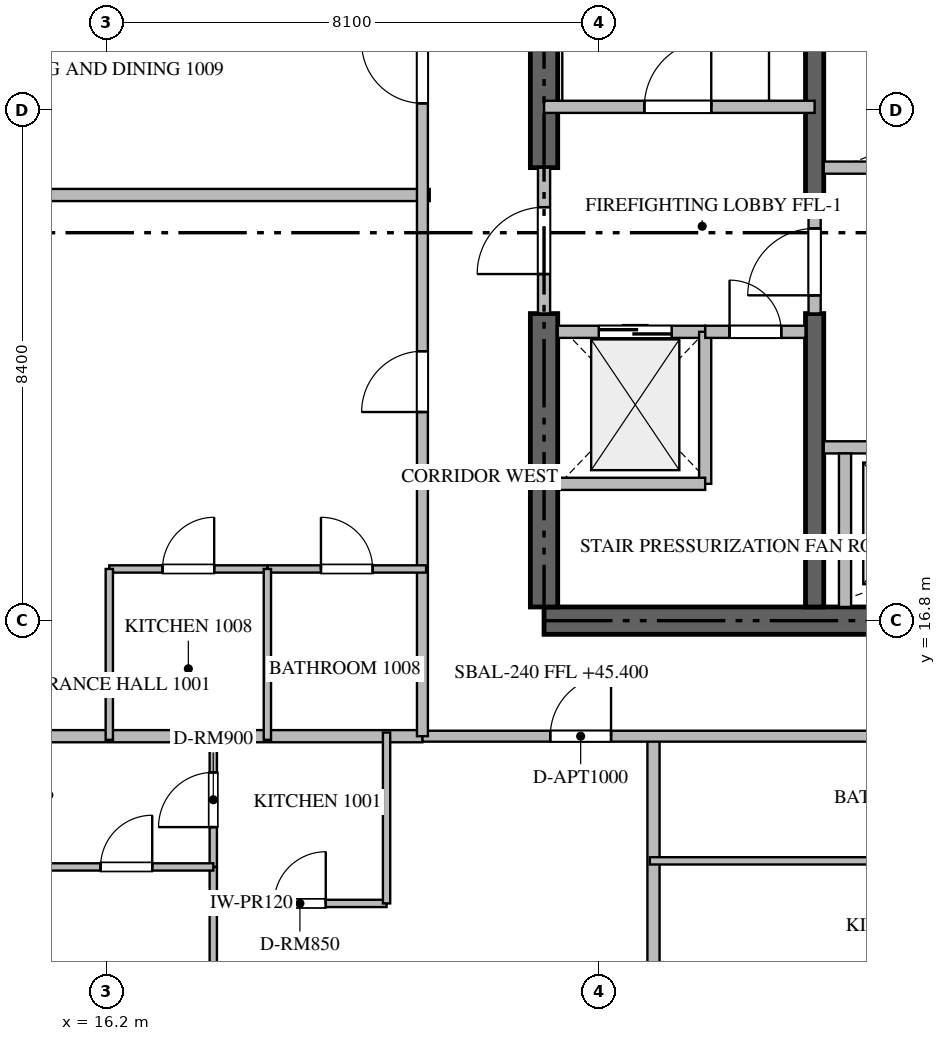
"""IFC4 building model, lengths in metres.
Left out: names, types, materials, properties, quantities, classifications, styles, units other than length and angle.
Written with IfcOpenShell. Run it as: python <this file> out.ifc"""

import sys

from ifc_helpers import new_model, si_unit, direction, frame, frame_2d, origin, place, context, subcontext, project, spatial, rectangle, extrude, source, transform, mapped, element, fill, save


model = new_model("IFC4")
c1 = context("Model", 3, precision=1e-05, world=origin(), true_north=direction((0.0, 1.0)))
c2 = subcontext(c1, "Body", "Model", "MODEL_VIEW")
j1 = project(units=[si_unit("LENGTHUNIT", "METRE"), si_unit("PLANEANGLEUNIT", "RADIAN")], contexts=[c1])
p1 = place(None, origin())
s1 = spatial("IfcSite", under=j1, at=p1, CompositionType="ELEMENT")
p2 = place(p1, origin())
s2 = spatial("IfcBuilding", under=s1, at=p2, CompositionType="ELEMENT")
p3 = place(p2, frame((0.0, 0.0, 45.45)))
s3 = spatial("IfcBuildingStorey", under=s2, at=p3, CompositionType="ELEMENT", Elevation=45.45)
p4 = place(p3, frame((23.4, 16.8, -0.26), z_axis=(0.0, 0.0, 1.0), x_axis=(1.0, 0.0, 0.0)))
e1 = element("IfcWall", 1, at=p4, inside=s3, PredefinedType="SHEAR", context=c2, shape_type="SweptSolid", body=[
    extrude(rectangle(XDim=18.0, YDim=0.45, at=frame_2d((9.0, 0.0))), origin(), (0.0, 0.0, 1.0), 3.748),
])
p5 = place(p3, frame((23.4, 17.025, -0.26), z_axis=(0.0, 0.0, 1.0), x_axis=(0.0, 1.0, 0.0)))
e2 = element("IfcWall", 2, at=p5, inside=s3, PredefinedType="SHEAR", context=c2, shape_type="SweptSolid", body=[
    extrude(rectangle(XDim=4.825, YDim=0.45, at=frame_2d((2.413, 0.0))), origin(), (0.0, 0.0, 1.0), 3.748),
])
p6 = place(p3, frame((23.4, 24.25, -0.26), z_axis=(0.0, 0.0, 1.0), x_axis=(0.0, 1.0, 0.0)))
e3 = element("IfcWall", 3, at=p6, inside=s3, PredefinedType="SHEAR", context=c2, shape_type="SweptSolid", body=[
    extrude(rectangle(XDim=9.125, YDim=0.45, at=frame_2d((4.562, 0.0))), origin(), (0.0, 0.0, 1.0), 3.748),
])
p7 = place(p3, frame((27.85, 17.025, -0.26), z_axis=(0.0, 0.0, 1.0), x_axis=(0.0, 1.0, 0.0)))
e4 = element("IfcWall", 4, at=p7, inside=s3, PredefinedType="SHEAR", context=c2, shape_type="SweptSolid", body=[
    extrude(rectangle(XDim=4.825, YDim=0.3, at=frame_2d((2.413, 0.0))), origin(), (0.0, 0.0, 1.0), 3.748),
])
p8 = place(p3, frame((27.85, 23.55, -0.26), z_axis=(0.0, 0.0, 1.0), x_axis=(0.0, 1.0, 0.0)))
e5 = element("IfcWall", 5, at=p8, inside=s3, PredefinedType="SHEAR", context=c2, shape_type="SweptSolid", body=[
    extrude(rectangle(XDim=9.825, YDim=0.3, at=frame_2d((4.913, 0.0))), origin(), (0.0, 0.0, 1.0), 3.748),
])
p9 = place(p3, frame((23.4, 25.25, 0.0), z_axis=(0.0, 0.0, 1.0), x_axis=(1.0, 0.0, 0.0)))
e6 = element("IfcWall", 6, at=p9, inside=s3, PredefinedType="STANDARD", context=c2, shape_type="SweptSolid", body=[
    extrude(rectangle(XDim=4.45, YDim=0.2, at=frame_2d((2.225, 0.0))), origin(), (0.0, 0.0, 1.0), 3.49),
])
p10 = place(p9, frame((1.65, 0.0, 0.0)))
e7 = element("IfcOpeningElement", 7, at=p10, cuts=e6, PredefinedType="OPENING", context=c2, shape_type="SweptSolid", body=[
    extrude(rectangle(XDim=1.1, YDim=2.15, at=frame_2d((0.55, 1.075))), frame((0.0, 0.11, 0.0), z_axis=(0.0, -1.0, 0.0), x_axis=(1.0, 0.0, 0.0)), (0.0, 0.0, 1.0), 0.22),
])
p11 = place(p3, frame((23.625, 21.55, 0.0), z_axis=(0.0, 0.0, 1.0), x_axis=(1.0, 0.0, 0.0)))
e8 = element("IfcWall", 8, at=p11, inside=s3, PredefinedType="STANDARD", context=c2, shape_type="SweptSolid", body=[
    extrude(rectangle(XDim=2.425, YDim=0.2, at=frame_2d((1.212, 0.0))), origin(), (0.0, 0.0, 1.0), 3.49),
])
p12 = place(p11, frame((0.675, 0.0, 0.0)))
e9 = element("IfcOpeningElement", 9, at=p12, cuts=e8, PredefinedType="OPENING", context=c2, shape_type="SweptSolid", body=[
    extrude(rectangle(XDim=1.2, YDim=2.2, at=frame_2d((0.6, 1.1))), frame((0.0, 0.11, 0.0), z_axis=(0.0, -1.0, 0.0), x_axis=(1.0, 0.0, 0.0)), (0.0, 0.0, 1.0), 0.22),
])
p13 = place(p3, frame((28.0, 19.65, 0.0), z_axis=(0.0, 0.0, 1.0), x_axis=(1.0, 0.0, 0.0)))
e10 = element("IfcWall", 10, at=p13, inside=s3, PredefinedType="STANDARD", context=c2, shape_type="SweptSolid", body=[
    extrude(rectangle(XDim=2.65, YDim=0.2, at=frame_2d((1.325, 0.0))), origin(), (0.0, 0.0, 1.0), 3.49),
])
p14 = place(p13, frame((0.9, 0.0, 0.0)))
e11 = element("IfcOpeningElement", 11, at=p14, cuts=e10, PredefinedType="OPENING", context=c2, shape_type="SweptSolid", body=[
    extrude(rectangle(XDim=1.1, YDim=2.2, at=frame_2d((0.55, 1.1))), frame((0.0, 0.11, 0.0), z_axis=(0.0, -1.0, 0.0), x_axis=(1.0, 0.0, 0.0)), (0.0, 0.0, 1.0), 0.22),
])
p15 = place(p3, frame((28.35, 17.025, 0.0), z_axis=(0.0, 0.0, 1.0), x_axis=(0.0, 1.0, 0.0)))
e12 = element("IfcWall", 12, at=p15, inside=s3, PredefinedType="STANDARD", context=c2, shape_type="SweptSolid", body=[
    extrude(rectangle(XDim=2.525, YDim=0.2, at=frame_2d((1.263, 0.0))), origin(), (0.0, 0.0, 1.0), 3.49),
])
p16 = place(p3, frame((28.0, 24.25, 0.0), z_axis=(0.0, 0.0, 1.0), x_axis=(1.0, 0.0, 0.0)))
e13 = element("IfcWall", 13, at=p16, inside=s3, PredefinedType="STANDARD", context=c2, shape_type="SweptSolid", body=[
    extrude(rectangle(XDim=2.425, YDim=0.2, at=frame_2d((1.212, 0.0))), origin(), (0.0, 0.0, 1.0), 3.49),
])
p17 = place(p3, frame((26.05, 19.05, 0.0), z_axis=(0.0, 0.0, 1.0), x_axis=(0.0, 1.0, 0.0)))
e14 = element("IfcWall", 14, at=p17, inside=s3, PredefinedType="STANDARD", context=c2, shape_type="SweptSolid", body=[
    extrude(rectangle(XDim=2.5, YDim=0.2, at=frame_2d((1.25, 0.0))), origin(), (0.0, 0.0, 1.0), 3.49),
])
p18 = place(p3, frame((23.625, 19.05, 0.0), z_axis=(0.0, 0.0, 1.0), x_axis=(1.0, 0.0, 0.0)))
e15 = element("IfcWall", 15, at=p18, inside=s3, PredefinedType="STANDARD", context=c2, shape_type="SweptSolid", body=[
    extrude(rectangle(XDim=2.425, YDim=0.2, at=frame_2d((1.212, 0.0))), origin(), (0.0, 0.0, 1.0), 3.49),
])
p19 = place(p3, frame((26.052, 21.55, 0.0), z_axis=(0.0, 0.0, 1.0), x_axis=(1.0, 0.0, 0.0)))
e16 = element("IfcWall", 16, at=p19, inside=s3, PredefinedType="STANDARD", context=c2, shape_type="SweptSolid", body=[
    extrude(rectangle(XDim=1.648, YDim=0.2, at=frame_2d((0.824, 0.0))), origin(), (0.0, 0.0, 1.0), 3.49),
])
p20 = place(p19, frame((0.399, 0.0, 0.0)))
e17 = element("IfcOpeningElement", 17, at=p20, cuts=e16, PredefinedType="OPENING", context=c2, shape_type="SweptSolid", body=[
    extrude(rectangle(XDim=0.85, YDim=2.1, at=frame_2d((0.425, 1.05))), frame((0.0, 0.11, 0.0), z_axis=(0.0, -1.0, 0.0), x_axis=(1.0, 0.0, 0.0)), (0.0, 0.0, 1.0), 0.22),
])
p21 = place(p3, frame((23.4, 21.852, 0.0), z_axis=(0.0, 0.0, 1.0), x_axis=(0.0, 1.0, 0.0)))
e18 = element("IfcWall", 18, at=p21, inside=s3, PredefinedType="STANDARD", context=c2, shape_type="SweptSolid", body=[
    extrude(rectangle(XDim=2.396, YDim=0.2, at=frame_2d((1.198, 0.0))), origin(), (0.0, 0.0, 1.0), 3.49),
])
p22 = place(p21, frame((0.648, 0.0, 0.0)))
e19 = element("IfcOpeningElement", 19, at=p22, cuts=e18, PredefinedType="OPENING", context=c2, shape_type="SweptSolid", body=[
    extrude(rectangle(XDim=1.1, YDim=2.15, at=frame_2d((0.55, 1.075))), frame((0.0, 0.11, 0.0), z_axis=(0.0, -1.0, 0.0), x_axis=(1.0, 0.0, 0.0)), (0.0, 0.0, 1.0), 0.22),
])
p23 = place(p3, frame((27.85, 21.852, 0.0), z_axis=(0.0, 0.0, 1.0), x_axis=(0.0, 1.0, 0.0)))
e20 = element("IfcWall", 20, at=p23, inside=s3, PredefinedType="STANDARD", context=c2, shape_type="SweptSolid", body=[
    extrude(rectangle(XDim=1.696, YDim=0.2, at=frame_2d((0.848, 0.0))), origin(), (0.0, 0.0, 1.0), 3.49),
])
p24 = place(p23, frame((0.298, 0.0, 0.0)))
e21 = element("IfcOpeningElement", 21, at=p24, cuts=e20, PredefinedType="OPENING", context=c2, shape_type="SweptSolid", body=[
    extrude(rectangle(XDim=1.1, YDim=2.15, at=frame_2d((0.55, 1.075))), frame((0.0, 0.11, 0.0), z_axis=(0.0, -1.0, 0.0), x_axis=(1.0, 0.0, 0.0)), (0.0, 0.0, 1.0), 0.22),
])
p25 = place(p3, frame((25.2, 0.282, 0.0), z_axis=(0.0, 0.0, 1.0), x_axis=(0.0, 1.0, 0.0)))
e22 = element("IfcWall", 22, at=p25, inside=s3, PredefinedType="PARTITIONING", context=c2, shape_type="SweptSolid", body=[
    extrude(rectangle(XDim=14.618, YDim=0.2, at=frame_2d((7.309, 0.0))), origin(), (0.0, 0.0, 1.0), 3.49),
])
p26 = place(p3, frame((6.082, 23.8, 0.0), z_axis=(0.0, 0.0, 1.0), x_axis=(1.0, 0.0, 0.0)))
e23 = element("IfcWall", 23, at=p26, inside=s3, PredefinedType="PARTITIONING", context=c2, shape_type="SweptSolid", body=[
    extrude(rectangle(XDim=15.438, YDim=0.2, at=frame_2d((7.719, 0.0))), origin(), (0.0, 0.0, 1.0), 3.49),
])
p27 = place(p3, frame((6.082, 14.9, 0.0), z_axis=(0.0, 0.0, 1.0), x_axis=(1.0, 0.0, 0.0)))
e24 = element("IfcWall", 24, at=p27, inside=s3, PredefinedType="PARTITIONING", context=c2, shape_type="SweptSolid", body=[
    extrude(rectangle(XDim=15.318, YDim=0.2, at=frame_2d((7.659, 0.0))), origin(), (0.0, 0.0, 1.0), 3.49),
])
p28 = place(p3, frame((21.402, 14.9, 0.0), z_axis=(0.0, 0.0, 1.0), x_axis=(1.0, 0.0, 0.0)))
e25 = element("IfcWall", 25, at=p28, inside=s3, PredefinedType="PARTITIONING", context=c2, shape_type="SweptSolid", body=[
    extrude(rectangle(XDim=21.996, YDim=0.18, at=frame_2d((10.998, 0.0))), origin(), (0.0, 0.0, 1.0), 3.49),
])
p29 = place(p28, frame((2.1, 0.0, 0.0)))
e26 = element("IfcOpeningElement", 26, at=p29, cuts=e25, PredefinedType="OPENING", context=c2, shape_type="SweptSolid", body=[
    extrude(rectangle(XDim=1.0, YDim=2.15, at=frame_2d((0.5, 1.075))), frame((0.0, 0.1, 0.0), z_axis=(0.0, -1.0, 0.0), x_axis=(1.0, 0.0, 0.0)), (0.0, 0.0, 1.0), 0.2),
])
p30 = place(p28, frame((14.319, 0.0, 0.0)))
e27 = element("IfcOpeningElement", 27, at=p30, cuts=e25, PredefinedType="OPENING", context=c2, shape_type="SweptSolid", body=[
    extrude(rectangle(XDim=1.0, YDim=2.15, at=frame_2d((0.5, 1.075))), frame((0.0, 0.1, 0.0), z_axis=(0.0, -1.0, 0.0), x_axis=(1.0, 0.0, 0.0)), (0.0, 0.0, 1.0), 0.2),
])
p31 = place(p28, frame((18.896, 0.0, 0.0)))
e28 = element("IfcOpeningElement", 28, at=p31, cuts=e25, PredefinedType="OPENING", context=c2, shape_type="SweptSolid", body=[
    extrude(rectangle(XDim=1.0, YDim=2.15, at=frame_2d((0.5, 1.075))), frame((0.0, 0.1, 0.0), z_axis=(0.0, -1.0, 0.0), x_axis=(1.0, 0.0, 0.0)), (0.0, 0.0, 1.0), 0.2),
])
p32 = place(p3, frame((21.4, 14.9, 0.0), z_axis=(0.0, 0.0, 1.0), x_axis=(0.0, 1.0, 0.0)))
e29 = element("IfcWall", 29, at=p32, inside=s3, PredefinedType="PARTITIONING", context=c2, shape_type="SweptSolid", body=[
    extrude(rectangle(XDim=20.6, YDim=0.18, at=frame_2d((10.3, 0.0))), origin(), (0.0, 0.0, 1.0), 3.49),
])
p33 = place(p32, frame((5.331, 0.0, 0.0)))
e30 = element("IfcOpeningElement", 30, at=p33, cuts=e29, PredefinedType="OPENING", context=c2, shape_type="SweptSolid", body=[
    extrude(rectangle(XDim=1.0, YDim=2.15, at=frame_2d((0.5, 1.075))), frame((0.0, 0.1, 0.0), z_axis=(0.0, -1.0, 0.0), x_axis=(1.0, 0.0, 0.0)), (0.0, 0.0, 1.0), 0.2),
])
p34 = place(p32, frame((10.408, 0.0, 0.0)))
e31 = element("IfcOpeningElement", 31, at=p34, cuts=e29, PredefinedType="OPENING", context=c2, shape_type="SweptSolid", body=[
    extrude(rectangle(XDim=1.0, YDim=2.15, at=frame_2d((0.5, 1.075))), frame((0.0, 0.1, 0.0), z_axis=(0.0, -1.0, 0.0), x_axis=(1.0, 0.0, 0.0)), (0.0, 0.0, 1.0), 0.2),
])
p35 = place(p3, frame((17.96, 12.15, 0.0), z_axis=(0.0, 0.0, 1.0), x_axis=(1.0, 0.0, 0.0)))
e32 = element("IfcWall", 32, at=p35, inside=s3, PredefinedType="PARTITIONING", context=c2, shape_type="SweptSolid", body=[
    extrude(rectangle(XDim=2.85, YDim=0.12, at=frame_2d((1.425, 0.0))), origin(), (0.0, 0.0, 1.0), 3.49),
])
p36 = place(p35, frame((1.0, 0.0, 0.0)))
e33 = element("IfcOpeningElement", 33, at=p36, cuts=e32, PredefinedType="OPENING", context=c2, shape_type="SweptSolid", body=[
    extrude(rectangle(XDim=0.85, YDim=2.1, at=frame_2d((0.425, 1.05))), frame((0.0, 0.07, 0.0), z_axis=(0.0, -1.0, 0.0), x_axis=(1.0, 0.0, 0.0)), (0.0, 0.0, 1.0), 0.14),
])
p37 = place(p3, frame((20.81, 12.15, 0.0), z_axis=(0.0, 0.0, 1.0), x_axis=(0.0, 1.0, 0.0)))
e34 = element("IfcWall", 34, at=p37, inside=s3, PredefinedType="PARTITIONING", context=c2, shape_type="SweptSolid", body=[
    extrude(rectangle(XDim=2.81, YDim=0.12, at=frame_2d((1.405, 0.0))), origin(), (0.0, 0.0, 1.0), 3.49),
])
p38 = place(p3, frame((17.96, 12.75, 0.0), z_axis=(0.0, 0.0, 1.0), x_axis=(0.0, 1.0, 0.0)))
e35 = element("IfcWall", 35, at=p38, inside=s3, PredefinedType="PARTITIONING", context=c2, shape_type="SweptSolid", body=[
    extrude(rectangle(XDim=2.21, YDim=0.12, at=frame_2d((1.105, 0.0))), origin(), (0.0, 0.0, 1.0), 3.49),
])
p39 = place(p38, frame((0.655, 0.0, 0.0)))
e36 = element("IfcOpeningElement", 36, at=p39, cuts=e35, PredefinedType="OPENING", context=c2, shape_type="SweptSolid", body=[
    extrude(rectangle(XDim=0.9, YDim=2.1, at=frame_2d((0.45, 1.05))), frame((0.0, 0.07, 0.0), z_axis=(0.0, -1.0, 0.0), x_axis=(1.0, 0.0, 0.0)), (0.0, 0.0, 1.0), 0.14),
])
p40 = place(p3, frame((17.96, 8.426, 0.0), z_axis=(0.0, 0.0, 1.0), x_axis=(0.0, 1.0, 0.0)))
e37 = element("IfcWall", 37, at=p40, inside=s3, PredefinedType="PARTITIONING", context=c2, shape_type="SweptSolid", body=[
    extrude(rectangle(XDim=4.322, YDim=0.12, at=frame_2d((2.161, 0.0))), origin(), (0.0, 0.0, 1.0), 3.49),
])
p41 = place(p3, frame((15.102, 12.75, 0.0), z_axis=(0.0, 0.0, 1.0), x_axis=(1.0, 0.0, 0.0)))
e38 = element("IfcWall", 38, at=p41, inside=s3, PredefinedType="PARTITIONING", context=c2, shape_type="SweptSolid", body=[
    extrude(rectangle(XDim=2.858, YDim=0.12, at=frame_2d((1.429, 0.0))), origin(), (0.0, 0.0, 1.0), 3.49),
])
p42 = place(p41, frame((1.004, 0.0, 0.0)))
e39 = element("IfcOpeningElement", 39, at=p42, cuts=e38, PredefinedType="OPENING", context=c2, shape_type="SweptSolid", body=[
    extrude(rectangle(XDim=0.85, YDim=2.1, at=frame_2d((0.425, 1.05))), frame((0.0, 0.07, 0.0), z_axis=(0.0, -1.0, 0.0), x_axis=(1.0, 0.0, 0.0)), (0.0, 0.0, 1.0), 0.14),
])
p43 = place(p3, frame((25.14, 12.85, 0.0), z_axis=(0.0, 0.0, 1.0), x_axis=(1.0, 0.0, 0.0)))
e40 = element("IfcWall", 40, at=p43, inside=s3, PredefinedType="PARTITIONING", context=c2, shape_type="SweptSolid", body=[
    extrude(rectangle(XDim=8.49, YDim=0.12, at=frame_2d((4.245, 0.0))), origin(), (0.0, 0.0, 1.0), 3.49),
])
p44 = place(p3, frame((16.25, 17.65, 0.0), z_axis=(0.0, 0.0, 1.0), x_axis=(1.0, 0.0, 0.0)))
e41 = element("IfcWall", 41, at=p44, inside=s3, PredefinedType="PARTITIONING", context=c2, shape_type="SweptSolid", body=[
    extrude(rectangle(XDim=2.6, YDim=0.12, at=frame_2d((1.3, 0.0))), origin(), (0.0, 0.0, 1.0), 3.49),
])
p45 = place(p44, frame((0.875, 0.0, 0.0)))
e42 = element("IfcOpeningElement", 42, at=p45, cuts=e41, PredefinedType="OPENING", context=c2, shape_type="SweptSolid", body=[
    extrude(rectangle(XDim=0.85, YDim=2.1, at=frame_2d((0.425, 1.05))), frame((0.0, 0.07, 0.0), z_axis=(0.0, -1.0, 0.0), x_axis=(1.0, 0.0, 0.0)), (0.0, 0.0, 1.0), 0.14),
])
p46 = place(p3, frame((18.852, 17.65, 0.0), z_axis=(0.0, 0.0, 1.0), x_axis=(1.0, 0.0, 0.0)))
e43 = element("IfcWall", 43, at=p46, inside=s3, PredefinedType="PARTITIONING", context=c2, shape_type="SweptSolid", body=[
    extrude(rectangle(XDim=2.608, YDim=0.12, at=frame_2d((1.304, 0.0))), origin(), (0.0, 0.0, 1.0), 3.49),
])
p47 = place(p46, frame((0.879, 0.0, 0.0)))
e44 = element("IfcOpeningElement", 44, at=p47, cuts=e43, PredefinedType="OPENING", context=c2, shape_type="SweptSolid", body=[
    extrude(rectangle(XDim=0.85, YDim=2.1, at=frame_2d((0.425, 1.05))), frame((0.0, 0.07, 0.0), z_axis=(0.0, -1.0, 0.0), x_axis=(1.0, 0.0, 0.0)), (0.0, 0.0, 1.0), 0.14),
])
for number, where, z_axis, x_axis in (
    (45, (18.85, 14.84, 0.0), (0.0, 0.0, 1.0), (0.0, 1.0, 0.0)),
    (46, (16.25, 14.84, 0.0), (0.0, 0.0, 1.0), (0.0, 1.0, 0.0)),
):
    element("IfcWall", number, at=place(p3, frame(where, z_axis=z_axis, x_axis=x_axis)), inside=s3, PredefinedType="PARTITIONING", context=c2, shape_type="SweptSolid", body=[
        extrude(rectangle(XDim=2.81, YDim=0.12, at=frame_2d((1.405, 0.0))), origin(), (0.0, 0.0, 1.0), 3.49),
    ])
m1 = source(origin(), c2, "Body", "SweptSolid", [
    extrude(rectangle(XDim=1.1, YDim=2.15, at=frame_2d((0.55, 1.075))), frame((0.0, 0.025, 0.0), z_axis=(0.0, -1.0, 0.0), x_axis=(1.0, 0.0, 0.0)), (0.0, 0.0, 1.0), 0.05),
])
p48 = place(p10, origin())
e47 = element("IfcDoor", 47, at=p48, inside=s3, OperationType="SINGLE_SWING_RIGHT", PredefinedType="DOOR", context=c2, shape_type="MappedRepresentation", body=[
    mapped(m1, transform((0.0, 0.0, 0.0), scale=1.0)),
])
fill(e7, e47)
m2 = source(origin(), c2, "Body", "SweptSolid", [
    extrude(rectangle(XDim=1.2, YDim=2.2, at=frame_2d((0.6, 1.1))), frame((0.0, 0.025, 0.0), z_axis=(0.0, -1.0, 0.0), x_axis=(1.0, 0.0, 0.0)), (0.0, 0.0, 1.0), 0.05),
])
p49 = place(p12, origin())
e48 = element("IfcDoor", 48, at=p49, inside=s3, OperationType="DOUBLE_DOOR_SLIDING", PredefinedType="DOOR", context=c2, shape_type="MappedRepresentation", body=[
    mapped(m2, transform((0.0, 0.0, 0.0), scale=1.0)),
])
fill(e9, e48)
m3 = source(origin(), c2, "Body", "SweptSolid", [
    extrude(rectangle(XDim=0.85, YDim=2.1, at=frame_2d((0.425, 1.05))), frame((0.0, 0.025, 0.0), z_axis=(0.0, -1.0, 0.0), x_axis=(1.0, 0.0, 0.0)), (0.0, 0.0, 1.0), 0.05),
])
p50 = place(p20, origin())
e49 = element("IfcDoor", 49, at=p50, inside=s3, OperationType="SINGLE_SWING_LEFT", PredefinedType="DOOR", context=c2, shape_type="MappedRepresentation", body=[
    mapped(m3, transform((0.0, 0.0, 0.0), scale=1.0)),
])
fill(e17, e49)
p51 = place(p22, origin())
e50 = element("IfcDoor", 50, at=p51, inside=s3, OperationType="SINGLE_SWING_LEFT", PredefinedType="DOOR", context=c2, shape_type="MappedRepresentation", body=[
    mapped(m1, transform((0.0, 0.0, 0.0), scale=1.0)),
])
fill(e19, e50)
p52 = place(p24, origin())
e51 = element("IfcDoor", 51, at=p52, inside=s3, OperationType="SINGLE_SWING_LEFT", PredefinedType="DOOR", context=c2, shape_type="MappedRepresentation", body=[
    mapped(m1, transform((0.0, 0.0, 0.0), scale=1.0)),
])
fill(e21, e51)
m4 = source(origin(), c2, "Body", "SweptSolid", [
    extrude(rectangle(XDim=1.0, YDim=2.15, at=frame_2d((0.5, 1.075))), frame((0.0, 0.025, 0.0), z_axis=(0.0, -1.0, 0.0), x_axis=(1.0, 0.0, 0.0)), (0.0, 0.0, 1.0), 0.05),
])
p53 = place(p29, origin())
e52 = element("IfcDoor", 52, at=p53, inside=s3, OperationType="SINGLE_SWING_RIGHT", PredefinedType="DOOR", context=c2, shape_type="MappedRepresentation", body=[
    mapped(m4, transform((0.0, 0.0, 0.0), scale=1.0)),
])
fill(e26, e52)
p54 = place(p33, origin())
e53 = element("IfcDoor", 53, at=p54, inside=s3, OperationType="SINGLE_SWING_LEFT", PredefinedType="DOOR", context=c2, shape_type="MappedRepresentation", body=[
    mapped(m4, transform((0.0, 0.0, 0.0), scale=1.0)),
])
fill(e30, e53)
p55 = place(p34, origin())
e54 = element("IfcDoor", 54, at=p55, inside=s3, OperationType="SINGLE_SWING_RIGHT", PredefinedType="DOOR", context=c2, shape_type="MappedRepresentation", body=[
    mapped(m4, transform((0.0, 0.0, 0.0), scale=1.0)),
])
fill(e31, e54)
p56 = place(p36, origin())
e55 = element("IfcDoor", 55, at=p56, inside=s3, OperationType="SINGLE_SWING_RIGHT", PredefinedType="DOOR", context=c2, shape_type="MappedRepresentation", body=[
    mapped(m3, transform((0.0, 0.0, 0.0), scale=1.0)),
])
fill(e33, e55)
m5 = source(origin(), c2, "Body", "SweptSolid", [
    extrude(rectangle(XDim=0.9, YDim=2.1, at=frame_2d((0.45, 1.05))), frame((0.0, 0.025, 0.0), z_axis=(0.0, -1.0, 0.0), x_axis=(1.0, 0.0, 0.0)), (0.0, 0.0, 1.0), 0.05),
])
p57 = place(p39, origin())
e56 = element("IfcDoor", 56, at=p57, inside=s3, OperationType="SINGLE_SWING_LEFT", PredefinedType="DOOR", context=c2, shape_type="MappedRepresentation", body=[
    mapped(m5, transform((0.0, 0.0, 0.0), scale=1.0)),
])
fill(e36, e56)
p58 = place(p42, origin())
e57 = element("IfcDoor", 57, at=p58, inside=s3, OperationType="SINGLE_SWING_RIGHT", PredefinedType="DOOR", context=c2, shape_type="MappedRepresentation", body=[
    mapped(m3, transform((0.0, 0.0, 0.0), scale=1.0)),
])
fill(e39, e57)
p59 = place(p45, origin())
e58 = element("IfcDoor", 58, at=p59, inside=s3, OperationType="SINGLE_SWING_RIGHT", PredefinedType="DOOR", context=c2, shape_type="MappedRepresentation", body=[
    mapped(m3, transform((0.0, 0.0, 0.0), scale=1.0)),
])
fill(e42, e58)
p60 = place(p47, origin())
e59 = element("IfcDoor", 59, at=p60, inside=s3, OperationType="SINGLE_SWING_LEFT", PredefinedType="DOOR", context=c2, shape_type="MappedRepresentation", body=[
    mapped(m3, transform((0.0, 0.0, 0.0), scale=1.0)),
])
fill(e44, e59)
save(model, sys.argv[1])
